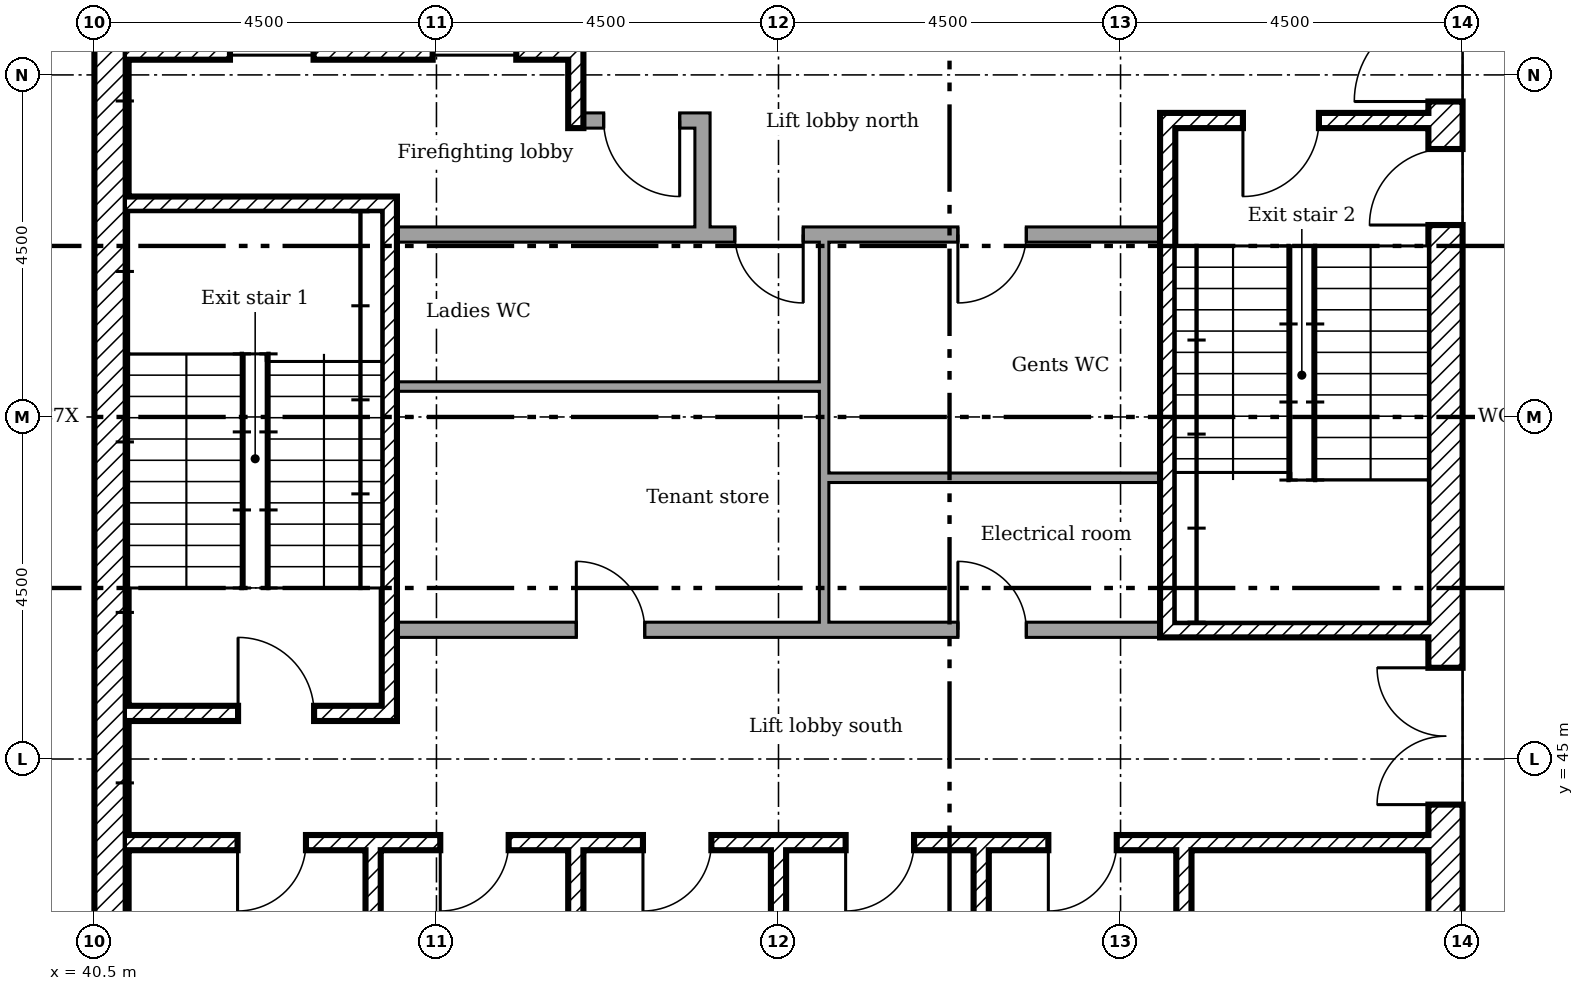
"""IFC4 building model, lengths in metres.
Left out: names, types, materials, properties, quantities, classifications, styles, units other than length and angle.
Written with IfcOpenShell. Run it as: python <this file> out.ifc"""

import sys

from ifc_helpers import new_model, si_unit, direction, frame, frame_2d, origin, place, context, subcontext, project, spatial, rectangle, extrude, element, fill, save


model = new_model("IFC4")
c1 = context("Model", 3, precision=1e-05, world=origin(), true_north=direction((0.0, 1.0)))
c2 = subcontext(c1, "Body", "Model", "MODEL_VIEW")
j1 = project(units=[si_unit("LENGTHUNIT", "METRE"), si_unit("PLANEANGLEUNIT", "RADIAN")], contexts=[c1])
p1 = place(None, origin())
s1 = spatial("IfcSite", under=j1, at=p1, CompositionType="ELEMENT")
p2 = place(p1, origin())
s2 = spatial("IfcBuilding", under=s1, at=p2, CompositionType="ELEMENT")
p3 = place(p2, frame((0.0, 0.0, 255.2)))
s3 = spatial("IfcBuildingStorey", under=s2, at=p3, CompositionType="ELEMENT", Elevation=255.2)
p4 = place(p3, frame((58.275, 40.5, 0.0), z_axis=(0.0, 0.0, 1.0), x_axis=(0.0, 1.0, 0.0)))
e1 = element("IfcWall", 1, at=p4, inside=s3, PredefinedType="SHEAR", context=c2, shape_type="SweptSolid", body=[
    extrude(rectangle(XDim=18.0, YDim=0.45, at=frame_2d((9.0, 0.0))), origin(), (0.0, 0.0, 1.0), 3.78),
])
p5 = place(p4, frame((13.15, 0.0, 0.0)))
e2 = element("IfcOpeningElement", 2, at=p5, cuts=e1, PredefinedType="OPENING", context=c2, shape_type="SweptSolid", body=[
    extrude(rectangle(XDim=1.2, YDim=2.1, at=frame_2d((0.6, 1.05))), frame((0.0, 0.235, 0.0), z_axis=(0.0, -1.0, 0.0), x_axis=(1.0, 0.0, 0.0)), (0.0, 0.0, 1.0), 0.47),
])
p6 = place(p4, frame((3.9, 0.0, 0.0)))
e3 = element("IfcOpeningElement", 3, at=p6, cuts=e1, PredefinedType="OPENING", context=c2, shape_type="SweptSolid", body=[
    extrude(rectangle(XDim=1.8, YDim=2.1, at=frame_2d((0.9, 1.05))), frame((0.0, 0.235, 0.0), z_axis=(0.0, -1.0, 0.0), x_axis=(1.0, 0.0, 0.0)), (0.0, 0.0, 1.0), 0.47),
])
p7 = place(p4, frame((11.525, 0.0, 0.0)))
e4 = element("IfcOpeningElement", 4, at=p7, cuts=e1, PredefinedType="OPENING", context=c2, shape_type="SweptSolid", body=[
    extrude(rectangle(XDim=1.0, YDim=2.1, at=frame_2d((0.5, 1.05))), frame((0.0, 0.235, 0.0), z_axis=(0.0, -1.0, 0.0), x_axis=(1.0, 0.0, 0.0)), (0.0, 0.0, 1.0), 0.47),
])
p8 = place(p3, frame((40.725, 40.95, 0.0), z_axis=(0.0, 0.0, 1.0), x_axis=(0.0, 1.0, 0.0)))
e5 = element("IfcWall", 5, at=p8, inside=s3, PredefinedType="SHEAR", context=c2, shape_type="SweptSolid", body=[
    extrude(rectangle(XDim=17.1, YDim=0.45, at=frame_2d((8.55, 0.0))), origin(), (0.0, 0.0, 1.0), 3.78),
])
p9 = place(p3, frame((46.833, 58.05, 0.0), z_axis=(0.0, 0.0, 1.0), x_axis=(0.0, -1.0, 0.0)))
e6 = element("IfcWall", 6, at=p9, inside=s3, PredefinedType="SHEAR", context=c2, shape_type="SweptSolid", body=[
    extrude(rectangle(XDim=4.75, YDim=0.2, at=frame_2d((2.375, 0.0))), origin(), (0.0, 0.0, 1.0), 3.78),
])
for number, where, z_axis, x_axis in (
    (7, (44.167, 40.95, 0.0), (0.0, 0.0, 1.0), (0.0, 1.0, 0.0)),
    (8, (46.833, 40.95, 0.0), (0.0, 0.0, 1.0), (0.0, 1.0, 0.0)),
    (9, (49.5, 40.95, 0.0), (0.0, 0.0, 1.0), (0.0, 1.0, 0.0)),
    (10, (52.167, 40.95, 0.0), (0.0, 0.0, 1.0), (0.0, 1.0, 0.0)),
    (11, (54.833, 40.95, 0.0), (0.0, 0.0, 1.0), (0.0, 1.0, 0.0)),
):
    element("IfcWall", number, at=place(p3, frame(where, z_axis=z_axis, x_axis=x_axis)), inside=s3, PredefinedType="SHEAR", context=c2, shape_type="SweptSolid", body=[
        extrude(rectangle(XDim=2.85, YDim=0.2, at=frame_2d((1.425, 0.0))), origin(), (0.0, 0.0, 1.0), 3.78),
    ])
p10 = place(p3, frame((48.5, 51.9, 0.0), z_axis=(0.0, 0.0, 1.0), x_axis=(0.0, 1.0, 0.0)))
e12 = element("IfcWall", 12, at=p10, inside=s3, PredefinedType="PARTITIONING", context=c2, shape_type="SweptSolid", body=[
    extrude(rectangle(XDim=1.6, YDim=0.2, at=frame_2d((0.8, 0.0))), origin(), (0.0, 0.0, 1.0), 3.78),
])
p11 = place(p3, frame((46.933, 53.4, 0.0)))
e13 = element("IfcWall", 13, at=p11, inside=s3, PredefinedType="PARTITIONING", context=c2, shape_type="SweptSolid", body=[
    extrude(rectangle(XDim=1.467, YDim=0.2, at=frame_2d((0.733, 0.0))), origin(), (0.0, 0.0, 1.0), 3.78),
])
p12 = place(p11, frame((0.267, 0.0, 0.0)))
e14 = element("IfcOpeningElement", 14, at=p12, cuts=e13, PredefinedType="OPENING", context=c2, shape_type="SweptSolid", body=[
    extrude(rectangle(XDim=1.0, YDim=2.1, at=frame_2d((0.5, 1.05))), frame((0.0, 0.11, 0.0), z_axis=(0.0, -1.0, 0.0), x_axis=(1.0, 0.0, 0.0)), (0.0, 0.0, 1.0), 0.22),
])
p13 = place(p3, frame((40.95, 54.3, 0.0)))
e15 = element("IfcWall", 15, at=p13, inside=s3, PredefinedType="SHEAR", context=c2, shape_type="SweptSolid", body=[
    extrude(rectangle(XDim=5.783, YDim=0.2, at=frame_2d((2.892, 0.0))), origin(), (0.0, 0.0, 1.0), 3.78),
])
p14 = place(p13, frame((1.333, 0.0, 0.0)))
e16 = element("IfcOpeningElement", 16, at=p14, cuts=e15, PredefinedType="OPENING", context=c2, shape_type="SweptSolid", body=[
    extrude(rectangle(XDim=1.1, YDim=2.1, at=frame_2d((0.55, 1.05))), frame((0.0, 0.11, 0.0), z_axis=(0.0, -1.0, 0.0), x_axis=(1.0, 0.0, 0.0)), (0.0, 0.0, 1.0), 0.22),
])
p15 = place(p13, frame((4.0, 0.0, 0.0)))
e17 = element("IfcOpeningElement", 17, at=p15, cuts=e15, PredefinedType="OPENING", context=c2, shape_type="SweptSolid", body=[
    extrude(rectangle(XDim=1.1, YDim=2.1, at=frame_2d((0.55, 1.05))), frame((0.0, 0.11, 0.0), z_axis=(0.0, -1.0, 0.0), x_axis=(1.0, 0.0, 0.0)), (0.0, 0.0, 1.0), 0.22),
])
p16 = place(p3, frame((40.95, 43.9, 0.0)))
e18 = element("IfcWall", 18, at=p16, inside=s3, PredefinedType="SHEAR", context=c2, shape_type="SweptSolid", body=[
    extrude(rectangle(XDim=17.1, YDim=0.2, at=frame_2d((8.55, 0.0))), origin(), (0.0, 0.0, 1.0), 3.78),
])
p17 = place(p16, frame((1.433, 0.0, 0.0)))
e19 = element("IfcOpeningElement", 19, at=p17, cuts=e18, PredefinedType="OPENING", context=c2, shape_type="SweptSolid", body=[
    extrude(rectangle(XDim=0.9, YDim=2.1, at=frame_2d((0.45, 1.05))), frame((0.0, 0.11, 0.0), z_axis=(0.0, -1.0, 0.0), x_axis=(1.0, 0.0, 0.0)), (0.0, 0.0, 1.0), 0.22),
])
p18 = place(p16, frame((4.1, 0.0, 0.0)))
e20 = element("IfcOpeningElement", 20, at=p18, cuts=e18, PredefinedType="OPENING", context=c2, shape_type="SweptSolid", body=[
    extrude(rectangle(XDim=0.9, YDim=2.1, at=frame_2d((0.45, 1.05))), frame((0.0, 0.11, 0.0), z_axis=(0.0, -1.0, 0.0), x_axis=(1.0, 0.0, 0.0)), (0.0, 0.0, 1.0), 0.22),
])
p19 = place(p16, frame((6.767, 0.0, 0.0)))
e21 = element("IfcOpeningElement", 21, at=p19, cuts=e18, PredefinedType="OPENING", context=c2, shape_type="SweptSolid", body=[
    extrude(rectangle(XDim=0.9, YDim=2.1, at=frame_2d((0.45, 1.05))), frame((0.0, 0.11, 0.0), z_axis=(0.0, -1.0, 0.0), x_axis=(1.0, 0.0, 0.0)), (0.0, 0.0, 1.0), 0.22),
])
p20 = place(p16, frame((9.433, 0.0, 0.0)))
e22 = element("IfcOpeningElement", 22, at=p20, cuts=e18, PredefinedType="OPENING", context=c2, shape_type="SweptSolid", body=[
    extrude(rectangle(XDim=0.9, YDim=2.1, at=frame_2d((0.45, 1.05))), frame((0.0, 0.11, 0.0), z_axis=(0.0, -1.0, 0.0), x_axis=(1.0, 0.0, 0.0)), (0.0, 0.0, 1.0), 0.22),
])
p21 = place(p16, frame((12.1, 0.0, 0.0)))
e23 = element("IfcOpeningElement", 23, at=p21, cuts=e18, PredefinedType="OPENING", context=c2, shape_type="SweptSolid", body=[
    extrude(rectangle(XDim=0.9, YDim=2.1, at=frame_2d((0.45, 1.05))), frame((0.0, 0.11, 0.0), z_axis=(0.0, -1.0, 0.0), x_axis=(1.0, 0.0, 0.0)), (0.0, 0.0, 1.0), 0.22),
])
p22 = place(p3, frame((44.38, 45.5, 0.0), z_axis=(0.0, 0.0, 1.0), x_axis=(0.0, 1.0, 0.0)))
e24 = element("IfcWall", 24, at=p22, inside=s3, PredefinedType="SHEAR", context=c2, shape_type="SweptSolid", body=[
    extrude(rectangle(XDim=6.9, YDim=0.2, at=frame_2d((3.45, 0.0))), origin(), (0.0, 0.0, 1.0), 3.78),
])
p23 = place(p3, frame((40.95, 52.3, 0.0)))
e25 = element("IfcWall", 25, at=p23, inside=s3, PredefinedType="SHEAR", context=c2, shape_type="SweptSolid", body=[
    extrude(rectangle(XDim=3.33, YDim=0.2, at=frame_2d((1.665, 0.0))), origin(), (0.0, 0.0, 1.0), 3.78),
])
p24 = place(p3, frame((40.95, 45.6, 0.0)))
e26 = element("IfcWall", 26, at=p24, inside=s3, PredefinedType="SHEAR", context=c2, shape_type="SweptSolid", body=[
    extrude(rectangle(XDim=3.33, YDim=0.2, at=frame_2d((1.665, 0.0))), origin(), (0.0, 0.0, 1.0), 3.78),
])
p25 = place(p24, frame((1.44, 0.0, 0.0)))
e27 = element("IfcOpeningElement", 27, at=p25, cuts=e26, PredefinedType="OPENING", context=c2, shape_type="SweptSolid", body=[
    extrude(rectangle(XDim=1.0, YDim=2.1, at=frame_2d((0.5, 1.05))), frame((0.0, 0.11, 0.0), z_axis=(0.0, -1.0, 0.0), x_axis=(1.0, 0.0, 0.0)), (0.0, 0.0, 1.0), 0.22),
])
p26 = place(p3, frame((54.52, 53.4, 0.0)))
e28 = element("IfcWall", 28, at=p26, inside=s3, PredefinedType="SHEAR", context=c2, shape_type="SweptSolid", body=[
    extrude(rectangle(XDim=3.53, YDim=0.2, at=frame_2d((1.765, 0.0))), origin(), (0.0, 0.0, 1.0), 3.78),
])
p27 = place(p26, frame((1.09, 0.0, 0.0)))
e29 = element("IfcOpeningElement", 29, at=p27, cuts=e28, PredefinedType="OPENING", context=c2, shape_type="SweptSolid", body=[
    extrude(rectangle(XDim=1.0, YDim=2.1, at=frame_2d((0.5, 1.05))), frame((0.0, 0.11, 0.0), z_axis=(0.0, -1.0, 0.0), x_axis=(1.0, 0.0, 0.0)), (0.0, 0.0, 1.0), 0.22),
])
p28 = place(p3, frame((54.52, 46.7, 0.0)))
e30 = element("IfcWall", 30, at=p28, inside=s3, PredefinedType="SHEAR", context=c2, shape_type="SweptSolid", body=[
    extrude(rectangle(XDim=3.53, YDim=0.2, at=frame_2d((1.765, 0.0))), origin(), (0.0, 0.0, 1.0), 3.78),
])
p29 = place(p3, frame((54.62, 46.8, 0.0), z_axis=(0.0, 0.0, 1.0), x_axis=(0.0, 1.0, 0.0)))
e31 = element("IfcWall", 31, at=p29, inside=s3, PredefinedType="SHEAR", context=c2, shape_type="SweptSolid", body=[
    extrude(rectangle(XDim=6.5, YDim=0.2, at=frame_2d((3.25, 0.0))), origin(), (0.0, 0.0, 1.0), 3.78),
])
p30 = place(p3, frame((44.48, 51.9, 0.0)))
e32 = element("IfcWall", 32, at=p30, inside=s3, PredefinedType="PARTITIONING", context=c2, shape_type="SweptSolid", body=[
    extrude(rectangle(XDim=10.04, YDim=0.2, at=frame_2d((5.02, 0.0))), origin(), (0.0, 0.0, 1.0), 3.78),
])
p31 = place(p30, frame((4.445, 0.0, 0.0)))
e33 = element("IfcOpeningElement", 33, at=p31, cuts=e32, PredefinedType="OPENING", context=c2, shape_type="SweptSolid", body=[
    extrude(rectangle(XDim=0.9, YDim=2.1, at=frame_2d((0.45, 1.05))), frame((0.0, 0.11, 0.0), z_axis=(0.0, -1.0, 0.0), x_axis=(1.0, 0.0, 0.0)), (0.0, 0.0, 1.0), 0.22),
])
p32 = place(p30, frame((7.38, 0.0, 0.0)))
e34 = element("IfcOpeningElement", 34, at=p32, cuts=e32, PredefinedType="OPENING", context=c2, shape_type="SweptSolid", body=[
    extrude(rectangle(XDim=0.9, YDim=2.1, at=frame_2d((0.45, 1.05))), frame((0.0, 0.11, 0.0), z_axis=(0.0, -1.0, 0.0), x_axis=(1.0, 0.0, 0.0)), (0.0, 0.0, 1.0), 0.22),
])
p33 = place(p3, frame((44.48, 46.7, 0.0)))
e35 = element("IfcWall", 35, at=p33, inside=s3, PredefinedType="PARTITIONING", context=c2, shape_type="SweptSolid", body=[
    extrude(rectangle(XDim=10.04, YDim=0.2, at=frame_2d((5.02, 0.0))), origin(), (0.0, 0.0, 1.0), 3.78),
])
p34 = place(p33, frame((2.36, 0.0, 0.0)))
e36 = element("IfcOpeningElement", 36, at=p34, cuts=e35, PredefinedType="OPENING", context=c2, shape_type="SweptSolid", body=[
    extrude(rectangle(XDim=0.9, YDim=2.1, at=frame_2d((0.45, 1.05))), frame((0.0, 0.11, 0.0), z_axis=(0.0, -1.0, 0.0), x_axis=(1.0, 0.0, 0.0)), (0.0, 0.0, 1.0), 0.22),
])
p35 = place(p33, frame((7.38, 0.0, 0.0)))
e37 = element("IfcOpeningElement", 37, at=p35, cuts=e35, PredefinedType="OPENING", context=c2, shape_type="SweptSolid", body=[
    extrude(rectangle(XDim=0.9, YDim=2.1, at=frame_2d((0.45, 1.05))), frame((0.0, 0.11, 0.0), z_axis=(0.0, -1.0, 0.0), x_axis=(1.0, 0.0, 0.0)), (0.0, 0.0, 1.0), 0.22),
])
p36 = place(p3, frame((50.1, 46.8, 0.0), z_axis=(0.0, 0.0, 1.0), x_axis=(0.0, 1.0, 0.0)))
e38 = element("IfcWall", 38, at=p36, inside=s3, PredefinedType="PARTITIONING", context=c2, shape_type="SweptSolid", body=[
    extrude(rectangle(XDim=1.962, YDim=0.125, at=frame_2d((0.981, 0.0))), origin(), (0.0, 0.0, 1.0), 3.78),
])
p37 = place(p3, frame((54.52, 48.7, 0.0), z_axis=(0.0, 0.0, 1.0), x_axis=(-1.0, 0.0, 0.0)))
e39 = element("IfcWall", 39, at=p37, inside=s3, PredefinedType="PARTITIONING", context=c2, shape_type="SweptSolid", body=[
    extrude(rectangle(XDim=4.357, YDim=0.125, at=frame_2d((2.179, 0.0))), origin(), (0.0, 0.0, 1.0), 3.78),
])
p38 = place(p3, frame((50.1, 48.7, 0.0), z_axis=(0.0, 0.0, 1.0), x_axis=(0.0, 1.0, 0.0)))
e40 = element("IfcWall", 40, at=p38, inside=s3, PredefinedType="PARTITIONING", context=c2, shape_type="SweptSolid", body=[
    extrude(rectangle(XDim=1.262, YDim=0.125, at=frame_2d((0.631, 0.0))), origin(), (0.0, 0.0, 1.0), 3.78),
])
p39 = place(p3, frame((50.038, 49.9, 0.0), z_axis=(0.0, 0.0, 1.0), x_axis=(-1.0, 0.0, 0.0)))
e41 = element("IfcWall", 41, at=p39, inside=s3, PredefinedType="PARTITIONING", context=c2, shape_type="SweptSolid", body=[
    extrude(rectangle(XDim=5.558, YDim=0.125, at=frame_2d((2.779, 0.0))), origin(), (0.0, 0.0, 1.0), 3.78),
])
p40 = place(p3, frame((50.1, 49.9, 0.0), z_axis=(0.0, 0.0, 1.0), x_axis=(0.0, 1.0, 0.0)))
e42 = element("IfcWall", 42, at=p40, inside=s3, PredefinedType="PARTITIONING", context=c2, shape_type="SweptSolid", body=[
    extrude(rectangle(XDim=1.9, YDim=0.125, at=frame_2d((0.95, 0.0))), origin(), (0.0, 0.0, 1.0), 3.78),
])
p41 = place(p5, origin())
e43 = element("IfcDoor", 43, at=p41, inside=s3, OperationType="SINGLE_SWING_RIGHT", PredefinedType="DOOR", context=c2, shape_type="SweptSolid", body=[
    extrude(rectangle(XDim=1.2, YDim=2.1, at=frame_2d((0.6, 1.05))), frame((0.0, 0.025, 0.0), z_axis=(0.0, -1.0, 0.0), x_axis=(1.0, 0.0, 0.0)), (0.0, 0.0, 1.0), 0.05),
])
fill(e2, e43)
p42 = place(p6, origin())
e44 = element("IfcDoor", 44, at=p42, inside=s3, OperationType="DOUBLE_DOOR_SINGLE_SWING", PredefinedType="DOOR", context=c2, shape_type="SweptSolid", body=[
    extrude(rectangle(XDim=1.8, YDim=2.1, at=frame_2d((0.9, 1.05))), frame((0.0, 0.025, 0.0), z_axis=(0.0, -1.0, 0.0), x_axis=(1.0, 0.0, 0.0)), (0.0, 0.0, 1.0), 0.05),
])
fill(e3, e44)
p43 = place(p25, origin())
e45 = element("IfcDoor", 45, at=p43, inside=s3, OperationType="SINGLE_SWING_RIGHT", PredefinedType="DOOR", context=c2, shape_type="SweptSolid", body=[
    extrude(rectangle(XDim=1.0, YDim=2.1, at=frame_2d((0.5, 1.05))), frame((0.0, 0.025, 0.0), z_axis=(0.0, -1.0, 0.0), x_axis=(1.0, 0.0, 0.0)), (0.0, 0.0, 1.0), 0.05),
])
fill(e27, e45)
p44 = place(p27, frame((1.0, 0.0, 0.0), x_axis=(-1.0, 0.0, 0.0)))
e46 = element("IfcDoor", 46, at=p44, inside=s3, OperationType="SINGLE_SWING_LEFT", PredefinedType="DOOR", context=c2, shape_type="SweptSolid", body=[
    extrude(rectangle(XDim=1.0, YDim=2.1, at=frame_2d((0.5, 1.05))), frame((0.0, 0.025, 0.0), z_axis=(0.0, -1.0, 0.0), x_axis=(1.0, 0.0, 0.0)), (0.0, 0.0, 1.0), 0.05),
])
fill(e29, e46)
p45 = place(p7, origin())
e47 = element("IfcDoor", 47, at=p45, inside=s3, OperationType="SINGLE_SWING_RIGHT", PredefinedType="DOOR", context=c2, shape_type="SweptSolid", body=[
    extrude(rectangle(XDim=1.0, YDim=2.1, at=frame_2d((0.5, 1.05))), frame((0.0, 0.025, 0.0), z_axis=(0.0, -1.0, 0.0), x_axis=(1.0, 0.0, 0.0)), (0.0, 0.0, 1.0), 0.05),
])
fill(e4, e47)
p46 = place(p12, frame((1.0, 0.0, 0.0), x_axis=(-1.0, 0.0, 0.0)))
e48 = element("IfcDoor", 48, at=p46, inside=s3, OperationType="SINGLE_SWING_RIGHT", PredefinedType="DOOR", context=c2, shape_type="SweptSolid", body=[
    extrude(rectangle(XDim=1.0, YDim=2.1, at=frame_2d((0.5, 1.05))), frame((0.0, 0.025, 0.0), z_axis=(0.0, -1.0, 0.0), x_axis=(1.0, 0.0, 0.0)), (0.0, 0.0, 1.0), 0.05),
])
fill(e14, e48)
p47 = place(p17, frame((0.9, 0.0, 0.0), x_axis=(-1.0, 0.0, 0.0)))
e49 = element("IfcDoor", 49, at=p47, inside=s3, OperationType="SINGLE_SWING_LEFT", PredefinedType="DOOR", context=c2, shape_type="SweptSolid", body=[
    extrude(rectangle(XDim=0.9, YDim=2.1, at=frame_2d((0.45, 1.05))), frame((0.0, 0.025, 0.0), z_axis=(0.0, -1.0, 0.0), x_axis=(1.0, 0.0, 0.0)), (0.0, 0.0, 1.0), 0.05),
])
fill(e19, e49)
p48 = place(p18, frame((0.9, 0.0, 0.0), x_axis=(-1.0, 0.0, 0.0)))
e50 = element("IfcDoor", 50, at=p48, inside=s3, OperationType="SINGLE_SWING_LEFT", PredefinedType="DOOR", context=c2, shape_type="SweptSolid", body=[
    extrude(rectangle(XDim=0.9, YDim=2.1, at=frame_2d((0.45, 1.05))), frame((0.0, 0.025, 0.0), z_axis=(0.0, -1.0, 0.0), x_axis=(1.0, 0.0, 0.0)), (0.0, 0.0, 1.0), 0.05),
])
fill(e20, e50)
p49 = place(p19, frame((0.9, 0.0, 0.0), x_axis=(-1.0, 0.0, 0.0)))
e51 = element("IfcDoor", 51, at=p49, inside=s3, OperationType="SINGLE_SWING_LEFT", PredefinedType="DOOR", context=c2, shape_type="SweptSolid", body=[
    extrude(rectangle(XDim=0.9, YDim=2.1, at=frame_2d((0.45, 1.05))), frame((0.0, 0.025, 0.0), z_axis=(0.0, -1.0, 0.0), x_axis=(1.0, 0.0, 0.0)), (0.0, 0.0, 1.0), 0.05),
])
fill(e21, e51)
p50 = place(p20, frame((0.9, 0.0, 0.0), x_axis=(-1.0, 0.0, 0.0)))
e52 = element("IfcDoor", 52, at=p50, inside=s3, OperationType="SINGLE_SWING_LEFT", PredefinedType="DOOR", context=c2, shape_type="SweptSolid", body=[
    extrude(rectangle(XDim=0.9, YDim=2.1, at=frame_2d((0.45, 1.05))), frame((0.0, 0.025, 0.0), z_axis=(0.0, -1.0, 0.0), x_axis=(1.0, 0.0, 0.0)), (0.0, 0.0, 1.0), 0.05),
])
fill(e22, e52)
p51 = place(p21, frame((0.9, 0.0, 0.0), x_axis=(-1.0, 0.0, 0.0)))
e53 = element("IfcDoor", 53, at=p51, inside=s3, OperationType="SINGLE_SWING_LEFT", PredefinedType="DOOR", context=c2, shape_type="SweptSolid", body=[
    extrude(rectangle(XDim=0.9, YDim=2.1, at=frame_2d((0.45, 1.05))), frame((0.0, 0.025, 0.0), z_axis=(0.0, -1.0, 0.0), x_axis=(1.0, 0.0, 0.0)), (0.0, 0.0, 1.0), 0.05),
])
fill(e23, e53)
p52 = place(p34, origin())
e54 = element("IfcDoor", 54, at=p52, inside=s3, OperationType="SINGLE_SWING_RIGHT", PredefinedType="DOOR", context=c2, shape_type="SweptSolid", body=[
    extrude(rectangle(XDim=0.9, YDim=2.1, at=frame_2d((0.45, 1.05))), frame((0.0, 0.025, 0.0), z_axis=(0.0, -1.0, 0.0), x_axis=(1.0, 0.0, 0.0)), (0.0, 0.0, 1.0), 0.05),
])
fill(e36, e54)
p53 = place(p31, frame((0.9, 0.0, 0.0), x_axis=(-1.0, 0.0, 0.0)))
e55 = element("IfcDoor", 55, at=p53, inside=s3, OperationType="SINGLE_SWING_RIGHT", PredefinedType="DOOR", context=c2, shape_type="SweptSolid", body=[
    extrude(rectangle(XDim=0.9, YDim=2.1, at=frame_2d((0.45, 1.05))), frame((0.0, 0.025, 0.0), z_axis=(0.0, -1.0, 0.0), x_axis=(1.0, 0.0, 0.0)), (0.0, 0.0, 1.0), 0.05),
])
fill(e33, e55)
p54 = place(p35, origin())
e56 = element("IfcDoor", 56, at=p54, inside=s3, OperationType="SINGLE_SWING_RIGHT", PredefinedType="DOOR", context=c2, shape_type="SweptSolid", body=[
    extrude(rectangle(XDim=0.9, YDim=2.1, at=frame_2d((0.45, 1.05))), frame((0.0, 0.025, 0.0), z_axis=(0.0, -1.0, 0.0), x_axis=(1.0, 0.0, 0.0)), (0.0, 0.0, 1.0), 0.05),
])
fill(e37, e56)
p55 = place(p32, frame((0.9, 0.0, 0.0), x_axis=(-1.0, 0.0, 0.0)))
e57 = element("IfcDoor", 57, at=p55, inside=s3, OperationType="SINGLE_SWING_LEFT", PredefinedType="DOOR", context=c2, shape_type="SweptSolid", body=[
    extrude(rectangle(XDim=0.9, YDim=2.1, at=frame_2d((0.45, 1.05))), frame((0.0, 0.025, 0.0), z_axis=(0.0, -1.0, 0.0), x_axis=(1.0, 0.0, 0.0)), (0.0, 0.0, 1.0), 0.05),
])
fill(e34, e57)
p56 = place(p14, origin())
e58 = element("IfcDoor", 58, at=p56, inside=s3, OperationType="SLIDING_TO_LEFT", PredefinedType="DOOR", context=c2, shape_type="SweptSolid", body=[
    extrude(rectangle(XDim=1.1, YDim=2.1, at=frame_2d((0.55, 1.05))), frame((0.0, 0.025, 0.0), z_axis=(0.0, -1.0, 0.0), x_axis=(1.0, 0.0, 0.0)), (0.0, 0.0, 1.0), 0.05),
])
fill(e16, e58)
p57 = place(p15, origin())
e59 = element("IfcDoor", 59, at=p57, inside=s3, OperationType="SLIDING_TO_LEFT", PredefinedType="DOOR", context=c2, shape_type="SweptSolid", body=[
    extrude(rectangle(XDim=1.1, YDim=2.1, at=frame_2d((0.55, 1.05))), frame((0.0, 0.025, 0.0), z_axis=(0.0, -1.0, 0.0), x_axis=(1.0, 0.0, 0.0)), (0.0, 0.0, 1.0), 0.05),
])
fill(e17, e59)
save(model, sys.argv[1])
